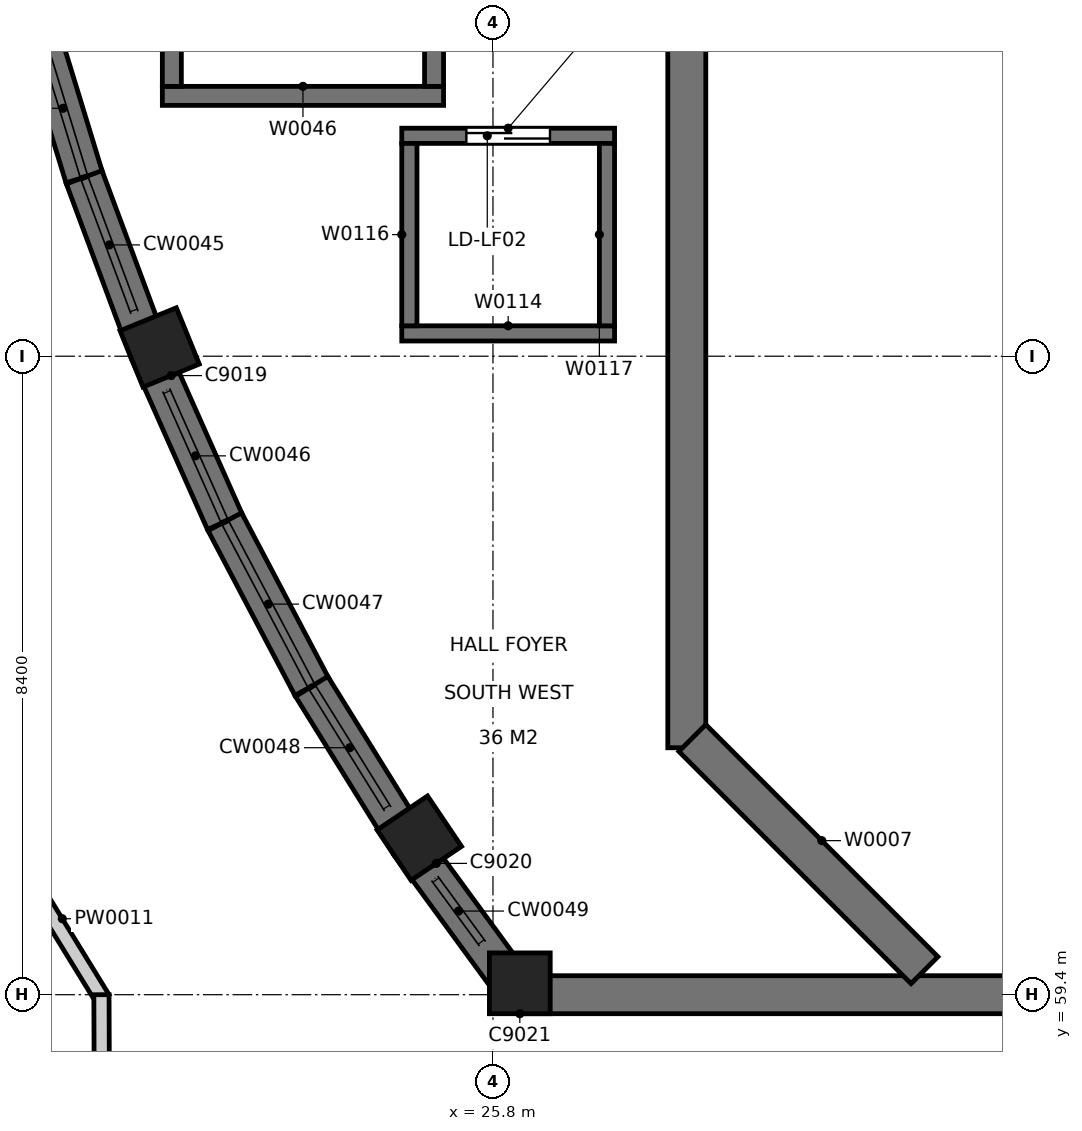
"""IFC4 building model, lengths in metres.
Left out: names, types, materials, properties, quantities, classifications, styles, units other than length and angle.
Written with IfcOpenShell. Run it as: python <this file> out.ifc"""

import sys

from ifc_helpers import new_model, si_unit, direction, frame, frame_2d, origin, origin_2d, place, context, subcontext, project, spatial, rectangle, extrude, element, fill, save


model = new_model("IFC4")
c1 = context("Model", 3, precision=1e-05, world=origin(), true_north=direction((0.0, 1.0)))
c2 = subcontext(c1, "Body", "Model", "MODEL_VIEW")
j1 = project(units=[si_unit("LENGTHUNIT", "METRE"), si_unit("PLANEANGLEUNIT", "RADIAN")], contexts=[c1])
p1 = place(None, origin())
s1 = spatial("IfcSite", under=j1, at=p1, CompositionType="ELEMENT")
p2 = place(p1, origin())
s2 = spatial("IfcBuilding", under=s1, at=p2, CompositionType="ELEMENT")
p3 = place(p2, frame((0.0, 0.0, 14.4)))
s3 = spatial("IfcBuildingStorey", under=s2, at=p3, CompositionType="ELEMENT", Elevation=14.4)
p4 = place(p3, frame((19.705, 72.496, 0.0), z_axis=(0.0, 0.0, 1.0), x_axis=(0.29250219685, -0.95626485078, 0.0)))
e1 = element("IfcWall", 1, at=p4, inside=s3, PredefinedType="SOLIDWALL", context=c2, shape_type="SweptSolid", body=[
    extrude(rectangle(XDim=2.449, YDim=0.5, at=frame_2d((1.225, 0.0))), origin(), (0.0, 0.0, 1.0), 4.8),
])
p5 = place(p4, frame((0.55, 0.0, 0.6)))
e2 = element("IfcOpeningElement", 2, at=p5, cuts=e1, PredefinedType="OPENING", context=c2, shape_type="SweptSolid", body=[
    extrude(rectangle(XDim=1.899, YDim=2.4, at=frame_2d((0.949, 1.2))), frame((0.0, 0.26, 0.0), z_axis=(0.0, -1.0, 0.0), x_axis=(1.0, 0.0, 0.0)), (0.0, 0.0, 1.0), 0.52),
])
p6 = place(p3, frame((20.422, 70.154, 0.0), z_axis=(0.0, 0.0, 1.0), x_axis=(0.348817204426, -0.937190779882, 0.0)))
e3 = element("IfcWall", 3, at=p6, inside=s3, PredefinedType="SOLIDWALL", context=c2, shape_type="SweptSolid", body=[
    extrude(rectangle(XDim=2.449, YDim=0.5, at=frame_2d((1.225, 0.0))), origin(), (0.0, 0.0, 1.0), 4.8),
])
p7 = place(p6, frame((0.0, 0.0, 0.6)))
e4 = element("IfcOpeningElement", 4, at=p7, cuts=e3, PredefinedType="OPENING", context=c2, shape_type="SweptSolid", body=[
    extrude(rectangle(XDim=1.899, YDim=2.4, at=frame_2d((0.949, 1.2))), frame((0.0, 0.26, 0.0), z_axis=(0.0, -1.0, 0.0), x_axis=(1.0, 0.0, 0.0)), (0.0, 0.0, 1.0), 0.52),
])
p8 = place(p3, frame((21.276, 67.859, 0.0), z_axis=(0.0, 0.0, 1.0), x_axis=(0.406767391574, -0.913531766909, 0.0)))
e5 = element("IfcWall", 5, at=p8, inside=s3, PredefinedType="SOLIDWALL", context=c2, shape_type="SweptSolid", body=[
    extrude(rectangle(XDim=2.449, YDim=0.5, at=frame_2d((1.224, 0.0))), origin(), (0.0, 0.0, 1.0), 4.8),
])
p9 = place(p8, frame((0.55, 0.0, 0.6)))
e6 = element("IfcOpeningElement", 6, at=p9, cuts=e5, PredefinedType="OPENING", context=c2, shape_type="SweptSolid", body=[
    extrude(rectangle(XDim=1.898, YDim=2.4, at=frame_2d((0.949, 1.2))), frame((0.0, 0.26, 0.0), z_axis=(0.0, -1.0, 0.0), x_axis=(1.0, 0.0, 0.0)), (0.0, 0.0, 1.0), 0.52),
])
p10 = place(p3, frame((22.272, 65.622, 0.0), z_axis=(0.0, 0.0, 1.0), x_axis=(0.466448872517, -0.884548161112, 0.0)))
e7 = element("IfcWall", 7, at=p10, inside=s3, PredefinedType="SOLIDWALL", context=c2, shape_type="SweptSolid", body=[
    extrude(rectangle(XDim=2.449, YDim=0.5, at=frame_2d((1.225, 0.0))), origin(), (0.0, 0.0, 1.0), 4.8),
])
p11 = place(p10, frame((0.0, 0.0, 0.6)))
e8 = element("IfcOpeningElement", 8, at=p11, cuts=e7, PredefinedType="OPENING", context=c2, shape_type="SweptSolid", body=[
    extrude(rectangle(XDim=2.449, YDim=2.4, at=frame_2d((1.225, 1.2))), frame((0.0, 0.26, 0.0), z_axis=(0.0, -1.0, 0.0), x_axis=(1.0, 0.0, 0.0)), (0.0, 0.0, 1.0), 0.52),
])
p12 = place(p3, frame((23.414, 63.456, 0.0), z_axis=(0.0, 0.0, 1.0), x_axis=(0.527702820527, -0.849429063082, 0.0)))
e9 = element("IfcWall", 9, at=p12, inside=s3, PredefinedType="SOLIDWALL", context=c2, shape_type="SweptSolid", body=[
    extrude(rectangle(XDim=2.449, YDim=0.5, at=frame_2d((1.224, 0.0))), origin(), (0.0, 0.0, 1.0), 4.8),
])
p13 = place(p12, frame((0.0, 0.0, 0.6)))
e10 = element("IfcOpeningElement", 10, at=p13, cuts=e9, PredefinedType="OPENING", context=c2, shape_type="SweptSolid", body=[
    extrude(rectangle(XDim=1.898, YDim=2.4, at=frame_2d((0.949, 1.2))), frame((0.0, 0.26, 0.0), z_axis=(0.0, -1.0, 0.0), x_axis=(1.0, 0.0, 0.0)), (0.0, 0.0, 1.0), 0.52),
])
p14 = place(p3, frame((24.707, 61.375, 0.0), z_axis=(0.0, 0.0, 1.0), x_axis=(0.590771306399, -0.806839056774, 0.0)))
e11 = element("IfcWall", 11, at=p14, inside=s3, PredefinedType="SOLIDWALL", context=c2, shape_type="SweptSolid", body=[
    extrude(rectangle(XDim=2.448, YDim=0.5, at=frame_2d((1.224, 0.0))), origin(), (0.0, 0.0, 1.0), 4.8),
])
p15 = place(p14, frame((0.551, 0.0, 0.6)))
e12 = element("IfcOpeningElement", 12, at=p15, cuts=e11, PredefinedType="OPENING", context=c2, shape_type="SweptSolid", body=[
    extrude(rectangle(XDim=1.068, YDim=2.4, at=frame_2d((0.534, 1.2))), frame((0.0, 0.26, 0.0), z_axis=(0.0, -1.0, 0.0), x_axis=(1.0, 0.0, 0.0)), (0.0, 0.0, 1.0), 0.52),
])
p16 = place(p3, frame((26.153, 59.4, 0.0), z_axis=(0.0, 0.0, 1.0), x_axis=(1.0, 0.0, 0.0)))
e13 = element("IfcWall", 13, at=p16, inside=s3, PredefinedType="SOLIDWALL", context=c2, shape_type="SweptSolid", body=[
    extrude(rectangle(XDim=32.894, YDim=0.5, at=frame_2d((16.447, 0.0))), origin(), (0.0, 0.0, 1.0), 4.8),
])
for number, where, z_axis, x_axis in (
    (14, (21.415, 67.916, 0.0), (0.0, 0.0, 1.0), (0.926, 0.377, 0.0)),
    (15, (24.831, 61.459, 0.0), (0.0, 0.0, 1.0), (0.829, 0.559, 0.0)),
    (16, (26.153, 59.55, 0.0), (0.0, 0.0, 1.0), (1.0, 0.0, 0.0)),
):
    element("IfcColumn", number, at=place(p3, frame(where, z_axis=z_axis, x_axis=x_axis)), inside=s3, PredefinedType="COLUMN", context=c2, shape_type="SweptSolid", body=[
        extrude(rectangle(XDim=0.8, YDim=0.8, at=origin_2d()), origin(), (0.0, 0.0, 1.0), 4.8),
    ])
p17 = place(p3, frame((28.35, 100.8, 0.0), z_axis=(0.0, 0.0, 1.0), x_axis=(0.0, -1.0, 0.0)))
e17 = element("IfcWall", 17, at=p17, inside=s3, PredefinedType="SOLIDWALL", context=c2, shape_type="SweptSolid", body=[
    extrude(rectangle(XDim=38.151, YDim=0.5, at=frame_2d((19.076, 0.0))), origin(), (0.0, 0.0, 1.0), 4.8),
])
p18 = place(p17, frame((5.45, 0.0, 0.0), z_axis=(0.0, 0.0, 1.0), x_axis=(-1.0, 0.0, 0.0)))
e18 = element("IfcOpeningElement", 18, at=p18, cuts=e17, PredefinedType="OPENING", context=c2, shape_type="SweptSolid", body=[
    extrude(rectangle(XDim=1.0, YDim=2.1, at=frame_2d((0.5, 1.05))), frame((0.0, 0.26, 0.0), z_axis=(0.0, -1.0, 0.0), x_axis=(1.0, 0.0, 0.0)), (0.0, 0.0, 1.0), 0.52),
])
p19 = place(p3, frame((28.423, 62.777, 0.0), z_axis=(0.0, 0.0, 1.0), x_axis=(0.707106781187, -0.707106781187, 0.0)))
e19 = element("IfcWall", 19, at=p19, inside=s3, PredefinedType="SOLIDWALL", context=c2, shape_type="SweptSolid", body=[
    extrude(rectangle(XDim=4.32, YDim=0.5, at=frame_2d((2.16, 0.0))), origin(), (0.0, 0.0, 1.0), 4.8),
])
p20 = place(p3, frame((21.45, 71.225, 0.0), z_axis=(0.0, 0.0, 1.0), x_axis=(1.0, 0.0, 0.0)))
e20 = element("IfcWall", 20, at=p20, inside=s3, PredefinedType="SOLIDWALL", context=c2, shape_type="SweptSolid", body=[
    extrude(rectangle(XDim=3.7, YDim=0.25, at=frame_2d((1.85, 0.0))), origin(), (0.0, 0.0, 1.0), 4.8),
])
p21 = place(p3, frame((21.575, 71.35, 0.0), z_axis=(0.0, 0.0, 1.0), x_axis=(0.0, 1.0, 0.0)))
e21 = element("IfcWall", 21, at=p21, inside=s3, PredefinedType="SOLIDWALL", context=c2, shape_type="SweptSolid", body=[
    extrude(rectangle(XDim=6.9, YDim=0.25, at=frame_2d((3.45, 0.0))), origin(), (0.0, 0.0, 1.0), 4.8),
])
p22 = place(p3, frame((25.025, 71.35, 0.0), z_axis=(0.0, 0.0, 1.0), x_axis=(0.0, 1.0, 0.0)))
e22 = element("IfcWall", 22, at=p22, inside=s3, PredefinedType="SOLIDWALL", context=c2, shape_type="SweptSolid", body=[
    extrude(rectangle(XDim=6.9, YDim=0.25, at=frame_2d((3.45, 0.0))), origin(), (0.0, 0.0, 1.0), 4.8),
])
p23 = place(p22, frame((5.15, 0.0, 0.0)))
e23 = element("IfcOpeningElement", 23, at=p23, cuts=e22, PredefinedType="OPENING", context=c2, shape_type="SweptSolid", body=[
    extrude(rectangle(XDim=1.2, YDim=2.1, at=frame_2d((0.6, 1.05))), frame((0.0, 0.135, 0.0), z_axis=(0.0, -1.0, 0.0), x_axis=(1.0, 0.0, 0.0)), (0.0, 0.0, 1.0), 0.27),
])
p24 = place(p3, frame((24.6, 68.1, 0.0), z_axis=(0.0, 0.0, 1.0), x_axis=(1.0, 0.0, 0.0)))
e24 = element("IfcWall", 24, at=p24, inside=s3, PredefinedType="SOLIDWALL", context=c2, shape_type="SweptSolid", body=[
    extrude(rectangle(XDim=2.8, YDim=0.2, at=frame_2d((1.4, 0.0))), origin(), (0.0, 0.0, 1.0), 4.8),
])
p25 = place(p3, frame((24.6, 70.7, 0.0), z_axis=(0.0, 0.0, 1.0), x_axis=(1.0, 0.0, 0.0)))
e25 = element("IfcWall", 25, at=p25, inside=s3, PredefinedType="SOLIDWALL", context=c2, shape_type="SweptSolid", body=[
    extrude(rectangle(XDim=2.8, YDim=0.2, at=frame_2d((1.4, 0.0))), origin(), (0.0, 0.0, 1.0), 4.8),
])
p26 = place(p25, frame((0.85, 0.0, 0.0)))
e26 = element("IfcOpeningElement", 26, at=p26, cuts=e25, PredefinedType="OPENING", context=c2, shape_type="SweptSolid", body=[
    extrude(rectangle(XDim=1.1, YDim=2.1, at=frame_2d((0.55, 1.05))), frame((0.0, 0.11, 0.0), z_axis=(0.0, -1.0, 0.0), x_axis=(1.0, 0.0, 0.0)), (0.0, 0.0, 1.0), 0.22),
])
for number, where, z_axis, x_axis in (
    (27, (24.7, 68.2, 0.0), (0.0, 0.0, 1.0), (0.0, 1.0, 0.0)),
    (28, (27.3, 68.2, 0.0), (0.0, 0.0, 1.0), (0.0, 1.0, 0.0)),
):
    element("IfcWall", number, at=place(p3, frame(where, z_axis=z_axis, x_axis=x_axis)), inside=s3, PredefinedType="SOLIDWALL", context=c2, shape_type="SweptSolid", body=[
        extrude(rectangle(XDim=2.4, YDim=0.2, at=frame_2d((1.2, 0.0))), origin(), (0.0, 0.0, 1.0), 4.8),
    ])
p27 = place(p2, frame((0.0, 0.0, 4.8)))
s4 = spatial("IfcBuildingStorey", under=s2, at=p27, CompositionType="ELEMENT", Elevation=4.8)
p28 = place(p27, frame((28.6, 71.4, 0.0), z_axis=(0.0, 0.0, 1.0), x_axis=(1.0, 0.0, 0.0)))
e29 = element("IfcWall", 29, at=p28, inside=s4, PredefinedType="PARTITIONING", context=c2, shape_type="SweptSolid", body=[
    extrude(rectangle(XDim=28.0, YDim=0.25, at=frame_2d((14.0, 0.0))), origin(), (0.0, 0.0, 1.0), 21.25),
])
p29 = place(p3, frame((20.664, 59.347, 0.0), z_axis=(0.0, 0.0, 1.0), x_axis=(-0.524021995027, 0.851704730953, 0.0)))
e30 = element("IfcWall", 30, at=p29, inside=s3, PredefinedType="PARAPET", context=c2, shape_type="SweptSolid", body=[
    extrude(rectangle(XDim=2.348, YDim=0.2, at=frame_2d((1.174, 0.0))), origin(), (0.0, 0.0, 1.0), 1.1),
])
p30 = place(p3, frame((20.749, 34.3, 0.0), z_axis=(0.0, 0.0, 1.0), x_axis=(-0.003987945994, 0.999992048112, 0.0)))
e31 = element("IfcWall", 31, at=p30, inside=s3, PredefinedType="PARAPET", context=c2, shape_type="SweptSolid", body=[
    extrude(rectangle(XDim=25.1, YDim=0.2, at=frame_2d((12.55, 0.0))), origin(), (0.0, 0.0, 1.0), 1.1),
])
p31 = place(p26, origin())
e32 = element("IfcDoor", 32, at=p31, inside=s3, OperationType="SLIDING_TO_LEFT", PredefinedType="DOOR", context=c2, shape_type="SweptSolid", body=[
    extrude(rectangle(XDim=1.1, YDim=2.1, at=frame_2d((0.55, 1.05))), frame((0.0, 0.025, 0.0), z_axis=(0.0, -1.0, 0.0), x_axis=(1.0, 0.0, 0.0)), (0.0, 0.0, 1.0), 0.05),
])
fill(e26, e32)
save(model, sys.argv[1])
